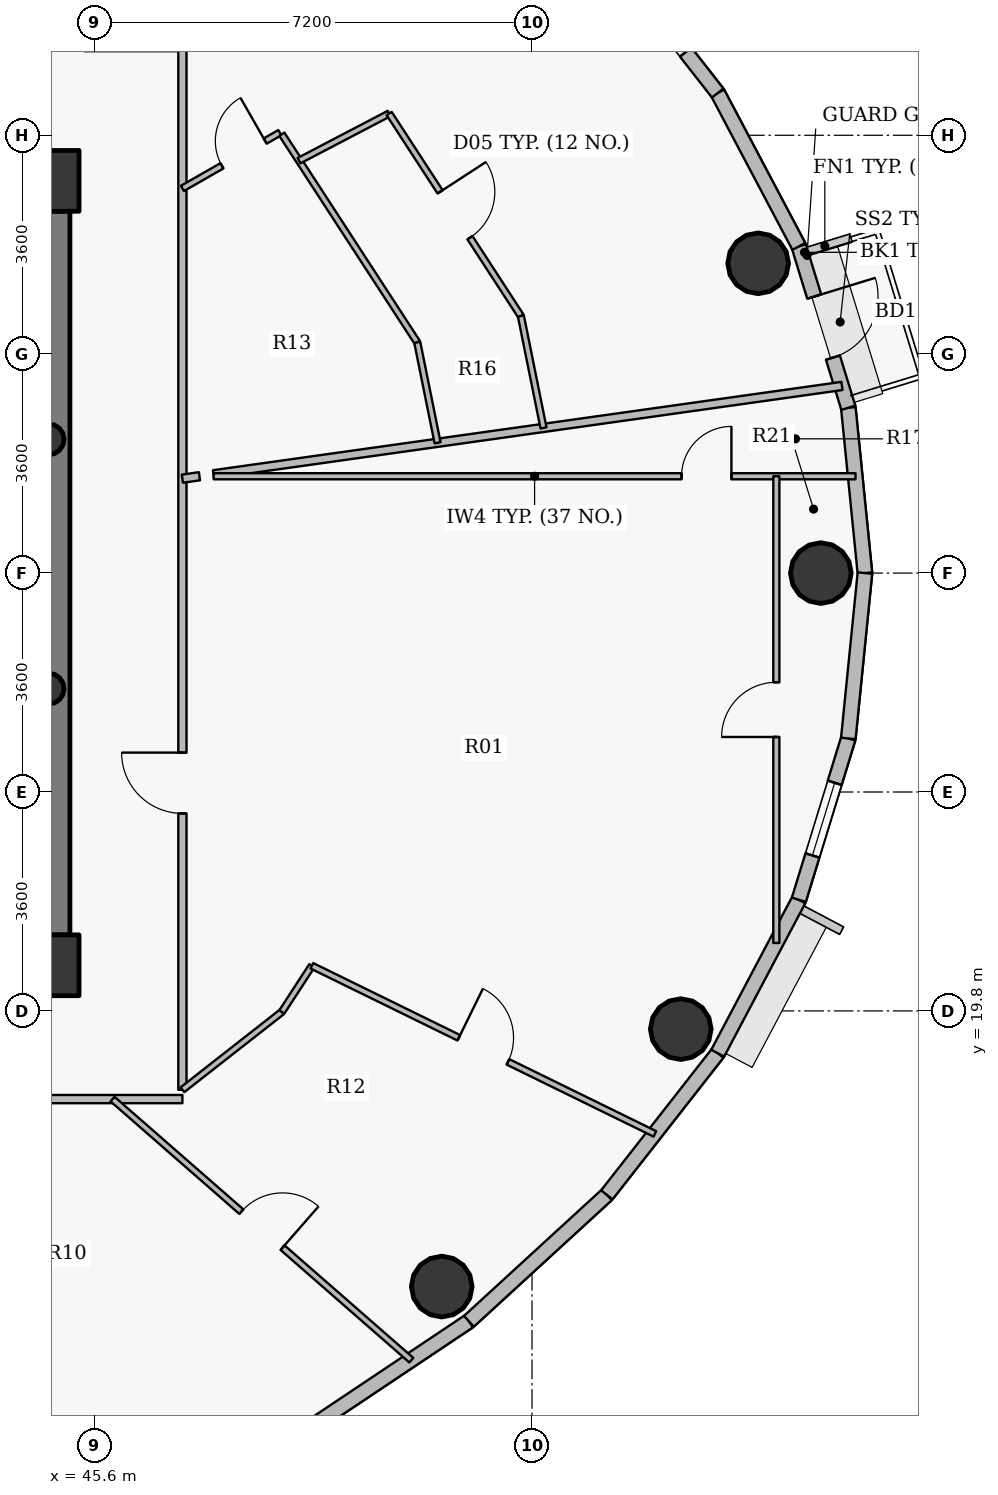
"""IFC4 building model, lengths in metres.
Left out: names, types, materials, properties, quantities, classifications, styles, units other than length and angle.
Written with IfcOpenShell. Run it as: python <this file> out.ifc"""

import sys

from ifc_helpers import new_model, si_unit, direction, frame, frame_2d, origin, origin_2d, place, context, subcontext, project, spatial, rectangle, hollow_circle, extrude, source, transform, mapped, element, fill, save


model = new_model("IFC4")
c1 = context("Model", 3, precision=1e-05, world=origin(), true_north=direction((0.0, 1.0)))
c2 = subcontext(c1, "Body", "Model", "MODEL_VIEW")
j1 = project(units=[si_unit("LENGTHUNIT", "METRE"), si_unit("PLANEANGLEUNIT", "RADIAN")], contexts=[c1])
p1 = place(None, origin())
s1 = spatial("IfcSite", under=j1, at=p1, CompositionType="ELEMENT")
p2 = place(p1, origin())
s2 = spatial("IfcBuilding", under=s1, at=p2, CompositionType="ELEMENT")
p3 = place(p2, frame((0.0, 0.0, 280.5)))
s3 = spatial("IfcBuildingStorey", under=s2, at=p3, CompositionType="ELEMENT", Elevation=280.5)
for number, where, z_axis, x_axis in (
    (1, (44.85, 20.55, 0.0), (0.0, 0.0, 1.0), (1.0, 0.0, 0.0)),
    (2, (44.85, 33.45, 0.0), (0.0, 0.0, 1.0), (1.0, 0.0, 0.0)),
):
    element("IfcColumn", number, at=place(p3, frame(where, z_axis=z_axis, x_axis=x_axis)), inside=s3, PredefinedType="COLUMN", context=c2, shape_type="SweptSolid", body=[
        extrude(rectangle(XDim=1.0, YDim=1.0, at=origin_2d()), origin(), (0.0, 0.0, 1.0), 3.75),
    ])
p4 = place(p3, frame((44.85, 32.95, 0.0), z_axis=(0.0, 0.0, 1.0), x_axis=(0.0, -1.0, 0.0)))
e3 = element("IfcWall", 3, at=p4, inside=s3, PredefinedType="SHEAR", context=c2, shape_type="SweptSolid", body=[
    extrude(rectangle(XDim=11.9, YDim=0.7, at=frame_2d((5.95, 0.0))), origin(), (0.0, 0.0, 1.0), 3.05),
])
for number, where, z_axis, x_axis in (
    (4, (57.55, 27.0, 0.0), (0.0, 0.0, 1.0), (1.0, 0.0, 0.0)),
    (5, (56.519, 32.094, 0.0), (0.0, 0.0, 1.0), (1.0, 0.0, 0.0)),
    (6, (51.315, 15.267, 0.0), (0.0, 0.0, 1.0), (1.0, 0.0, 0.0)),
    (7, (55.246, 19.5, 0.0), (0.0, 0.0, 1.0), (1.0, 0.0, 0.0)),
):
    element("IfcColumn", number, at=place(p3, frame(where, z_axis=z_axis, x_axis=x_axis)), inside=s3, PredefinedType="COLUMN", context=c2, shape_type="SweptSolid", body=[
        extrude(hollow_circle(Radius=0.5, WallThickness=0.032, at=origin_2d()), origin(), (0.0, 0.0, 1.0), 3.75),
    ])
for number, where, z_axis, x_axis in (
    (8, (44.85, 25.1, 0.0), (0.0, 0.0, 1.0), (1.0, 0.0, 0.0)),
    (9, (44.85, 29.2, 0.0), (0.0, 0.0, 1.0), (1.0, 0.0, 0.0)),
):
    element("IfcColumn", number, at=place(p3, frame(where, z_axis=z_axis, x_axis=x_axis)), inside=s3, PredefinedType="COLUMN", context=c2, shape_type="SweptSolid", body=[
        extrude(hollow_circle(Radius=0.254, WallThickness=0.02, at=origin_2d()), origin(), (0.0, 0.0, 1.0), 3.75),
    ])
p5 = place(p3, frame((58.002, 29.719, 0.0), z_axis=(0.0, 0.0, 1.0), x_axis=(0.099972526841, -0.99499019788, 0.0)))
e10 = element("IfcWall", 10, at=p5, inside=s3, PredefinedType="SOLIDWALL", context=c2, shape_type="SweptSolid", body=[
    extrude(rectangle(XDim=2.733, YDim=0.24, at=frame_2d((1.366, 0.0))), origin(), (0.0, 0.0, 1.0), 3.5),
])
p6 = place(p3, frame((57.188, 32.372, 0.0), z_axis=(0.0, 0.0, 1.0), x_axis=(0.2931213403, -0.956075248012, 0.0)))
e11 = element("IfcWall", 11, at=p6, inside=s3, PredefinedType="SOLIDWALL", context=c2, shape_type="SweptSolid", body=[
    extrude(rectangle(XDim=2.775, YDim=0.24, at=frame_2d((1.388, 0.0))), origin(), (0.0, 0.0, 1.0), 3.5),
])
p7 = place(p6, frame((0.863, 0.0, 0.0)))
e12 = element("IfcOpeningElement", 12, at=p7, cuts=e11, PredefinedType="OPENING", context=c2, shape_type="SweptSolid", body=[
    extrude(rectangle(XDim=1.05, YDim=2.15, at=origin_2d()), frame((0.525, 0.13, 1.075), z_axis=(0.0, -1.0, 0.0), x_axis=(1.0, 0.0, 0.0)), (0.0, 0.0, 1.0), 0.26),
])
p8 = place(p3, frame((55.854, 34.895, 0.0), z_axis=(0.0, 0.0, 1.0), x_axis=(0.467628269026, -0.883925224218, 0.0)))
e13 = element("IfcWall", 13, at=p8, inside=s3, PredefinedType="SOLIDWALL", context=c2, shape_type="SweptSolid", body=[
    extrude(rectangle(XDim=2.854, YDim=0.24, at=frame_2d((1.427, 0.0))), origin(), (0.0, 0.0, 1.0), 3.5),
])
p9 = place(p3, frame((54.03, 37.225, 0.0), z_axis=(0.0, 0.0, 1.0), x_axis=(0.616337186556, -0.787482363275, 0.0)))
e14 = element("IfcWall", 14, at=p9, inside=s3, PredefinedType="SOLIDWALL", context=c2, shape_type="SweptSolid", body=[
    extrude(rectangle(XDim=2.958, YDim=0.24, at=frame_2d((1.479, 0.0))), origin(), (0.0, 0.0, 1.0), 3.5),
])
p10 = place(p9, frame((0.854, 0.0, 0.9)))
e15 = element("IfcOpeningElement", 15, at=p10, cuts=e14, PredefinedType="OPENING", context=c2, shape_type="SweptSolid", body=[
    extrude(rectangle(XDim=1.25, YDim=1.65, at=origin_2d()), frame((0.625, 0.13, 0.825), z_axis=(0.0, -1.0, 0.0), x_axis=(1.0, 0.0, 0.0)), (0.0, 0.0, 1.0), 0.26),
])
p11 = place(p3, frame((51.762, 14.696, 0.0), z_axis=(0.0, 0.0, 1.0), x_axis=(-0.831250592635, -0.55589787933, 0.0)))
e16 = element("IfcWall", 16, at=p11, inside=s3, PredefinedType="SOLIDWALL", context=c2, shape_type="SweptSolid", body=[
    extrude(rectangle(XDim=3.197, YDim=0.24, at=frame_2d((1.599, 0.0))), origin(), (0.0, 0.0, 1.0), 3.5),
])
p12 = place(p3, frame((54.03, 16.775, 0.0), z_axis=(0.0, 0.0, 1.0), x_axis=(-0.737068506972, -0.675818034703, 0.0)))
e17 = element("IfcWall", 17, at=p12, inside=s3, PredefinedType="SOLIDWALL", context=c2, shape_type="SweptSolid", body=[
    extrude(rectangle(XDim=3.077, YDim=0.24, at=frame_2d((1.539, 0.0))), origin(), (0.0, 0.0, 1.0), 3.5),
])
p13 = place(p3, frame((55.854, 19.105, 0.0), z_axis=(0.0, 0.0, 1.0), x_axis=(-0.616337186556, -0.787482363275, 0.0)))
e18 = element("IfcWall", 18, at=p13, inside=s3, PredefinedType="SOLIDWALL", context=c2, shape_type="SweptSolid", body=[
    extrude(rectangle(XDim=2.958, YDim=0.24, at=frame_2d((1.479, 0.0))), origin(), (0.0, 0.0, 1.0), 3.5),
])
p14 = place(p3, frame((57.188, 21.628, 0.0), z_axis=(0.0, 0.0, 1.0), x_axis=(-0.467628269026, -0.883925224218, 0.0)))
e19 = element("IfcWall", 19, at=p14, inside=s3, PredefinedType="SOLIDWALL", context=c2, shape_type="SweptSolid", body=[
    extrude(rectangle(XDim=2.854, YDim=0.24, at=frame_2d((1.427, 0.0))), origin(), (0.0, 0.0, 1.0), 3.5),
])
p15 = place(p3, frame((58.002, 24.281, 0.0), z_axis=(0.0, 0.0, 1.0), x_axis=(-0.2931213403, -0.956075248012, 0.0)))
e20 = element("IfcWall", 20, at=p15, inside=s3, PredefinedType="SOLIDWALL", context=c2, shape_type="SweptSolid", body=[
    extrude(rectangle(XDim=2.775, YDim=0.24, at=frame_2d((1.388, 0.0))), origin(), (0.0, 0.0, 1.0), 3.5),
])
p16 = place(p15, frame((0.763, 0.0, 0.9)))
e21 = element("IfcOpeningElement", 21, at=p16, cuts=e20, PredefinedType="OPENING", context=c2, shape_type="SweptSolid", body=[
    extrude(rectangle(XDim=1.25, YDim=1.65, at=origin_2d()), frame((0.625, 0.13, 0.825), z_axis=(0.0, -1.0, 0.0), x_axis=(1.0, 0.0, 0.0)), (0.0, 0.0, 1.0), 0.26),
])
p17 = place(p3, frame((58.275, 27.0, 0.0), z_axis=(0.0, 0.0, 1.0), x_axis=(-0.099972526841, -0.99499019788, 0.0)))
e22 = element("IfcWall", 22, at=p17, inside=s3, PredefinedType="SOLIDWALL", context=c2, shape_type="SweptSolid", body=[
    extrude(rectangle(XDim=2.733, YDim=0.24, at=frame_2d((1.366, 0.0))), origin(), (0.0, 0.0, 1.0), 3.5),
])
p18 = place(p3, frame((36.95, 18.35, 0.0), z_axis=(0.0, 0.0, 1.0), x_axis=(1.0, 0.0, 0.0)))
e23 = element("IfcWall", 23, at=p18, inside=s3, PredefinedType="PARTITIONING", context=c2, shape_type="SweptSolid", body=[
    extrude(rectangle(XDim=10.1, YDim=0.135, at=frame_2d((5.05, 0.0))), origin(), (0.0, 0.0, 1.0), 3.035),
])
p19 = place(p18, frame((1.521, 0.0, 0.0)))
e24 = element("IfcOpeningElement", 24, at=p19, cuts=e23, PredefinedType="OPENING", context=c2, shape_type="SweptSolid", body=[
    extrude(rectangle(XDim=1.0, YDim=2.15, at=origin_2d()), frame((0.5, 0.078, 1.075), z_axis=(0.0, -1.0, 0.0), x_axis=(1.0, 0.0, 0.0)), (0.0, 0.0, 1.0), 0.155),
])
p20 = place(p3, frame((40.952, 18.35, 0.0), z_axis=(0.0, 0.0, 1.0), x_axis=(0.496803688517, -0.867862947173, 0.0)))
e25 = element("IfcWall", 25, at=p20, inside=s3, PredefinedType="PARTITIONING", context=c2, shape_type="SweptSolid", body=[
    extrude(rectangle(XDim=8.304, YDim=0.135, at=frame_2d((4.152, 0.0))), origin(), (0.0, 0.0, 1.0), 2.985),
])
p21 = place(p3, frame((45.901, 18.35, 0.0), z_axis=(0.0, 0.0, 1.0), x_axis=(0.753056223084, -0.657956172457, 0.0)))
e26 = element("IfcWall", 26, at=p21, inside=s3, PredefinedType="PARTITIONING", context=c2, shape_type="SweptSolid", body=[
    extrude(rectangle(XDim=6.526, YDim=0.1, at=frame_2d((3.263, 0.0))), origin(), (0.0, 0.0, 1.0), 2.985),
])
p22 = place(p21, frame((2.813, 0.0, 0.0)))
e27 = element("IfcOpeningElement", 27, at=p22, cuts=e26, PredefinedType="OPENING", context=c2, shape_type="SweptSolid", body=[
    extrude(rectangle(XDim=0.9, YDim=2.1, at=origin_2d()), frame((0.45, 0.06, 1.05), z_axis=(0.0, -1.0, 0.0), x_axis=(1.0, 0.0, 0.0)), (0.0, 0.0, 1.0), 0.12),
])
p23 = place(p3, frame((47.05, 18.503, 0.0), z_axis=(0.0, 0.0, 1.0), x_axis=(0.0, 1.0, 0.0)))
e28 = element("IfcWall", 28, at=p23, inside=s3, PredefinedType="PARTITIONING", context=c2, shape_type="SweptSolid", body=[
    extrude(rectangle(XDim=17.147, YDim=0.135, at=frame_2d((8.574, 0.0))), origin(), (0.0, 0.0, 1.0), 3.035),
])
p24 = place(p23, frame((4.545, 0.0, 0.0)))
e29 = element("IfcOpeningElement", 29, at=p24, cuts=e28, PredefinedType="OPENING", context=c2, shape_type="SweptSolid", body=[
    extrude(rectangle(XDim=1.0, YDim=2.15, at=origin_2d()), frame((0.5, 0.078, 1.075), z_axis=(0.0, -1.0, 0.0), x_axis=(1.0, 0.0, 0.0)), (0.0, 0.0, 1.0), 0.155),
])
p25 = place(p3, frame((47.05, 18.503, 0.0), z_axis=(0.0, 0.0, 1.0), x_axis=(0.787328855274, 0.616533270516, 0.0)))
e30 = element("IfcWall", 30, at=p25, inside=s3, PredefinedType="PARTITIONING", context=c2, shape_type="SweptSolid", body=[
    extrude(rectangle(XDim=2.077, YDim=0.1, at=frame_2d((1.039, 0.0))), origin(), (0.0, 0.0, 1.0), 3.035),
])
p26 = place(p3, frame((47.05, 28.553, 0.0), z_axis=(0.0, 0.0, 1.0), x_axis=(0.990308552968, 0.138884736087, 0.0)))
e31 = element("IfcWall", 31, at=p26, inside=s3, PredefinedType="PARTITIONING", context=c2, shape_type="SweptSolid", body=[
    extrude(rectangle(XDim=0.283, YDim=0.135, at=frame_2d((0.142, 0.0))), origin(), (0.0, 0.0, 1.0), 3.5),
])
p27 = place(p3, frame((47.05, 33.326, 0.0), z_axis=(0.0, 0.0, 1.0), x_axis=(0.867827775188, 0.496865125172, 0.0)))
e32 = element("IfcWall", 32, at=p27, inside=s3, PredefinedType="PARTITIONING", context=c2, shape_type="SweptSolid", body=[
    extrude(rectangle(XDim=1.846, YDim=0.1, at=frame_2d((0.923, 0.0))), origin(), (0.0, 0.0, 1.0), 3.5),
])
p28 = place(p27, frame((0.749, 0.0, 0.0)))
e33 = element("IfcOpeningElement", 33, at=p28, cuts=e32, PredefinedType="OPENING", context=c2, shape_type="SweptSolid", body=[
    extrude(rectangle(XDim=0.82, YDim=2.1, at=origin_2d()), frame((0.41, 0.06, 1.05), z_axis=(0.0, -1.0, 0.0), x_axis=(1.0, 0.0, 0.0)), (0.0, 0.0, 1.0), 0.12),
])
p29 = place(p3, frame((47.562, 28.625, 0.0), z_axis=(0.0, 0.0, 1.0), x_axis=(0.990269276455, 0.139164507362, 0.0)))
e34 = element("IfcWall", 34, at=p29, inside=s3, PredefinedType="PARTITIONING", context=c2, shape_type="SweptSolid", body=[
    extrude(rectangle(XDim=10.437, YDim=0.135, at=frame_2d((5.218, 0.0))), origin(), (0.0, 0.0, 1.0), 2.985),
])
p30 = place(p3, frame((47.564, 28.592, 0.0), z_axis=(0.0, 0.0, 1.0), x_axis=(1.0, 0.0, 0.0)))
e35 = element("IfcWall", 35, at=p30, inside=s3, PredefinedType="PARTITIONING", context=c2, shape_type="SweptSolid", body=[
    extrude(rectangle(XDim=10.555, YDim=0.1, at=frame_2d((5.278, 0.0))), origin(), (0.0, 0.0, 1.0), 2.985),
])
p31 = place(p30, frame((7.695, 0.0, 0.0)))
e36 = element("IfcOpeningElement", 36, at=p31, cuts=e35, PredefinedType="OPENING", context=c2, shape_type="SweptSolid", body=[
    extrude(rectangle(XDim=0.82, YDim=2.1, at=origin_2d()), frame((0.41, 0.06, 1.05), z_axis=(0.0, -1.0, 0.0), x_axis=(1.0, 0.0, 0.0)), (0.0, 0.0, 1.0), 0.12),
])
p32 = place(p3, frame((48.685, 19.783, 0.0), z_axis=(0.0, 0.0, 1.0), x_axis=(0.545519027777, 0.838098437138, 0.0)))
e37 = element("IfcWall", 37, at=p32, inside=s3, PredefinedType="PARTITIONING", context=c2, shape_type="SweptSolid", body=[
    extrude(rectangle(XDim=0.905, YDim=0.1, at=frame_2d((0.453, 0.0))), origin(), (0.0, 0.0, 1.0), 3.5),
])
p33 = place(p3, frame((48.685, 34.217, 0.0), z_axis=(0.0, 0.0, 1.0), x_axis=(0.54540855562, -0.8381703332, 0.0)))
e38 = element("IfcWall", 38, at=p33, inside=s3, PredefinedType="PARTITIONING", context=c2, shape_type="SweptSolid", body=[
    extrude(rectangle(XDim=4.084, YDim=0.1, at=frame_2d((2.042, 0.0))), origin(), (0.0, 0.0, 1.0), 3.035),
])
p34 = place(p3, frame((48.968, 33.782, 0.0), z_axis=(0.0, 0.0, 1.0), x_axis=(0.886102824681, 0.463488709779, 0.0)))
e39 = element("IfcWall", 39, at=p34, inside=s3, PredefinedType="PARTITIONING", context=c2, shape_type="SweptSolid", body=[
    extrude(rectangle(XDim=1.672, YDim=0.1, at=frame_2d((0.836, 0.0))), origin(), (0.0, 0.0, 1.0), 3.5),
])
p35 = place(p3, frame((49.179, 20.542, 0.0), z_axis=(0.0, 0.0, 1.0), x_axis=(0.89799659679, -0.440002400167, 0.0)))
e40 = element("IfcWall", 40, at=p35, inside=s3, PredefinedType="PARTITIONING", context=c2, shape_type="SweptSolid", body=[
    extrude(rectangle(XDim=6.283, YDim=0.1, at=frame_2d((3.141, 0.0))), origin(), (0.0, 0.0, 1.0), 2.985),
])
p36 = place(p35, frame((2.691, 0.0, 0.0)))
e41 = element("IfcOpeningElement", 41, at=p36, cuts=e40, PredefinedType="OPENING", context=c2, shape_type="SweptSolid", body=[
    extrude(rectangle(XDim=0.9, YDim=2.1, at=origin_2d()), frame((0.45, 0.06, 1.05), z_axis=(0.0, -1.0, 0.0), x_axis=(1.0, 0.0, 0.0)), (0.0, 0.0, 1.0), 0.12),
])
p37 = place(p3, frame((50.45, 34.558, 0.0), z_axis=(0.0, 0.0, 1.0), x_axis=(0.545448348881, -0.838144437853, 0.0)))
e42 = element("IfcWall", 42, at=p37, inside=s3, PredefinedType="PARTITIONING", context=c2, shape_type="SweptSolid", body=[
    extrude(rectangle(XDim=3.973, YDim=0.1, at=frame_2d((1.986, 0.0))), origin(), (0.0, 0.0, 1.0), 3.035),
])
p38 = place(p37, frame((1.536, 0.0, 0.0)))
e43 = element("IfcOpeningElement", 43, at=p38, cuts=e42, PredefinedType="OPENING", context=c2, shape_type="SweptSolid", body=[
    extrude(rectangle(XDim=0.9, YDim=2.1, at=origin_2d()), frame((0.45, 0.06, 1.05), z_axis=(0.0, -1.0, 0.0), x_axis=(1.0, 0.0, 0.0)), (0.0, 0.0, 1.0), 0.12),
])
p39 = place(p3, frame((50.913, 30.794, 0.0), z_axis=(0.0, 0.0, 1.0), x_axis=(0.198233557602, -0.980154812588, 0.0)))
e44 = element("IfcWall", 44, at=p39, inside=s3, PredefinedType="PARTITIONING", context=c2, shape_type="SweptSolid", body=[
    extrude(rectangle(XDim=1.685, YDim=0.1, at=frame_2d((0.842, 0.0))), origin(), (0.0, 0.0, 1.0), 3.035),
])
p40 = place(p3, frame((52.617, 31.228, 0.0), z_axis=(0.0, 0.0, 1.0), x_axis=(0.198191443997, -0.980163329005, 0.0)))
e45 = element("IfcWall", 45, at=p40, inside=s3, PredefinedType="PARTITIONING", context=c2, shape_type="SweptSolid", body=[
    extrude(rectangle(XDim=1.877, YDim=0.1, at=frame_2d((0.939, 0.0))), origin(), (0.0, 0.0, 1.0), 3.035),
])
p41 = place(p3, frame((56.818, 20.917, 0.0), z_axis=(0.0, 0.0, 1.0), x_axis=(0.0, 1.0, 0.0)))
e46 = element("IfcWall", 46, at=p41, inside=s3, PredefinedType="PARTITIONING", context=c2, shape_type="SweptSolid", body=[
    extrude(rectangle(XDim=7.675, YDim=0.1, at=frame_2d((3.837, 0.0))), origin(), (0.0, 0.0, 1.0), 2.985),
])
p42 = place(p41, frame((3.388, 0.0, 0.0)))
e47 = element("IfcOpeningElement", 47, at=p42, cuts=e46, PredefinedType="OPENING", context=c2, shape_type="SweptSolid", body=[
    extrude(rectangle(XDim=0.9, YDim=2.1, at=origin_2d()), frame((0.45, 0.06, 1.05), z_axis=(0.0, -1.0, 0.0), x_axis=(1.0, 0.0, 0.0)), (0.0, 0.0, 1.0), 0.12),
])
for number, where, z_axis, x_axis in (
    (48, (45.2, 33.8, 0.0), (0.0, 0.0, 1.0), (-1.0, 0.0, 0.0)),
    (49, (44.36, 20.2, 0.0), (0.0, 0.0, 1.0), (1.0, 0.0, 0.0)),
):
    element("IfcWall", number, at=place(p3, frame(where, z_axis=z_axis, x_axis=x_axis)), inside=s3, PredefinedType="PARTITIONING", context=c2, shape_type="SweptSolid", body=[
        extrude(rectangle(XDim=0.84, YDim=0.135, at=frame_2d((0.42, 0.0))), origin(), (0.0, 0.0, 1.0), 3.035),
    ])
for number, where, z_axis, x_axis in (
    (50, (45.2, 20.508, 0.0), (0.0, 0.0, 1.0), (0.0, 1.0, 0.0)),
    (51, (45.2, 32.96, 0.0), (0.0, 0.0, 1.0), (0.0, 1.0, 0.0)),
):
    element("IfcWall", number, at=place(p3, frame(where, z_axis=z_axis, x_axis=x_axis)), inside=s3, PredefinedType="PARTITIONING", context=c2, shape_type="SweptSolid", body=[
        extrude(rectangle(XDim=0.532, YDim=0.135, at=frame_2d((0.266, 0.0))), origin(), (0.0, 0.0, 1.0), 3.5),
    ])
m1 = source(origin(), c2, "Body", "SweptSolid", [
    extrude(rectangle(XDim=1.05, YDim=2.15, at=origin_2d()), frame((0.525, 0.025, 1.075), z_axis=(0.0, -1.0, 0.0), x_axis=(1.0, 0.0, 0.0)), (0.0, 0.0, 1.0), 0.05),
])
p43 = place(p7, origin())
e52 = element("IfcDoor", 52, at=p43, inside=s3, OperationType="SINGLE_SWING_LEFT", PredefinedType="DOOR", context=c2, shape_type="MappedRepresentation", body=[
    mapped(m1, transform((0.0, 0.0, 0.0), x_axis=(1.0, 0.0, 0.0), y_axis=(0.0, 1.0, 0.0), z_axis=(0.0, 0.0, 1.0), scale=1.0)),
])
fill(e12, e52)
m2 = source(origin(), c2, "Body", "SweptSolid", [
    extrude(rectangle(XDim=1.25, YDim=1.65, at=origin_2d()), frame((0.625, 0.03, 0.825), z_axis=(0.0, -1.0, 0.0), x_axis=(1.0, 0.0, 0.0)), (0.0, 0.0, 1.0), 0.06),
])
p44 = place(p10, origin())
e53 = element("IfcWindow", 53, at=p44, inside=s3, PartitioningType="SINGLE_PANEL", PredefinedType="WINDOW", context=c2, shape_type="MappedRepresentation", body=[
    mapped(m2, transform((0.0, 0.0, 0.0), x_axis=(1.0, 0.0, 0.0), y_axis=(0.0, 1.0, 0.0), z_axis=(0.0, 0.0, 1.0), scale=1.0)),
])
fill(e15, e53)
p45 = place(p16, origin())
e54 = element("IfcWindow", 54, at=p45, inside=s3, PartitioningType="SINGLE_PANEL", PredefinedType="WINDOW", context=c2, shape_type="MappedRepresentation", body=[
    mapped(m2, transform((0.0, 0.0, 0.0), x_axis=(1.0, 0.0, 0.0), y_axis=(0.0, 1.0, 0.0), z_axis=(0.0, 0.0, 1.0), scale=1.0)),
])
fill(e21, e54)
m3 = source(origin(), c2, "Body", "SweptSolid", [
    extrude(rectangle(XDim=0.82, YDim=2.1, at=origin_2d()), frame((0.41, 0.025, 1.05), z_axis=(0.0, -1.0, 0.0), x_axis=(1.0, 0.0, 0.0)), (0.0, 0.0, 1.0), 0.05),
])
p46 = place(p28, origin())
e55 = element("IfcDoor", 55, at=p46, inside=s3, OperationType="SINGLE_SWING_RIGHT", PredefinedType="DOOR", context=c2, shape_type="MappedRepresentation", body=[
    mapped(m3, transform((0.0, 0.0, 0.0), x_axis=(1.0, 0.0, 0.0), y_axis=(0.0, 1.0, 0.0), z_axis=(0.0, 0.0, 1.0), scale=1.0)),
])
fill(e33, e55)
m4 = source(origin(), c2, "Body", "SweptSolid", [
    extrude(rectangle(XDim=0.9, YDim=2.1, at=origin_2d()), frame((0.45, 0.025, 1.05), z_axis=(0.0, -1.0, 0.0), x_axis=(1.0, 0.0, 0.0)), (0.0, 0.0, 1.0), 0.05),
])
p47 = place(p38, origin())
e56 = element("IfcDoor", 56, at=p47, inside=s3, OperationType="SINGLE_SWING_LEFT", PredefinedType="DOOR", context=c2, shape_type="MappedRepresentation", body=[
    mapped(m4, transform((0.0, 0.0, 0.0), x_axis=(1.0, 0.0, 0.0), y_axis=(0.0, 1.0, 0.0), z_axis=(0.0, 0.0, 1.0), scale=1.0)),
])
fill(e43, e56)
m5 = source(origin(), c2, "Body", "SweptSolid", [
    extrude(rectangle(XDim=1.0, YDim=2.15, at=origin_2d()), frame((0.5, 0.025, 1.075), z_axis=(0.0, -1.0, 0.0), x_axis=(1.0, 0.0, 0.0)), (0.0, 0.0, 1.0), 0.05),
])
p48 = place(p24, origin())
e57 = element("IfcDoor", 57, at=p48, inside=s3, OperationType="SINGLE_SWING_RIGHT", PredefinedType="DOOR", context=c2, shape_type="MappedRepresentation", body=[
    mapped(m5, transform((0.0, 0.0, 0.0), x_axis=(1.0, 0.0, 0.0), y_axis=(0.0, 1.0, 0.0), z_axis=(0.0, 0.0, 1.0), scale=1.0)),
])
fill(e29, e57)
p49 = place(p36, origin())
e58 = element("IfcDoor", 58, at=p49, inside=s3, OperationType="SINGLE_SWING_LEFT", PredefinedType="DOOR", context=c2, shape_type="MappedRepresentation", body=[
    mapped(m4, transform((0.0, 0.0, 0.0), x_axis=(1.0, 0.0, 0.0), y_axis=(0.0, 1.0, 0.0), z_axis=(0.0, 0.0, 1.0), scale=1.0)),
])
fill(e41, e58)
p50 = place(p31, origin())
e59 = element("IfcDoor", 59, at=p50, inside=s3, OperationType="SINGLE_SWING_RIGHT", PredefinedType="DOOR", context=c2, shape_type="MappedRepresentation", body=[
    mapped(m3, transform((0.0, 0.0, 0.0), x_axis=(1.0, 0.0, 0.0), y_axis=(0.0, 1.0, 0.0), z_axis=(0.0, 0.0, 1.0), scale=1.0)),
])
fill(e36, e59)
p51 = place(p42, origin())
e60 = element("IfcDoor", 60, at=p51, inside=s3, OperationType="SINGLE_SWING_LEFT", PredefinedType="DOOR", context=c2, shape_type="MappedRepresentation", body=[
    mapped(m4, transform((0.0, 0.0, 0.0), x_axis=(1.0, 0.0, 0.0), y_axis=(0.0, 1.0, 0.0), z_axis=(0.0, 0.0, 1.0), scale=1.0)),
])
fill(e47, e60)
p52 = place(p22, origin())
e61 = element("IfcDoor", 61, at=p52, inside=s3, OperationType="SINGLE_SWING_RIGHT", PredefinedType="DOOR", context=c2, shape_type="MappedRepresentation", body=[
    mapped(m4, transform((0.0, 0.0, 0.0), x_axis=(1.0, 0.0, 0.0), y_axis=(0.0, 1.0, 0.0), z_axis=(0.0, 0.0, 1.0), scale=1.0)),
])
fill(e27, e61)
save(model, sys.argv[1])
